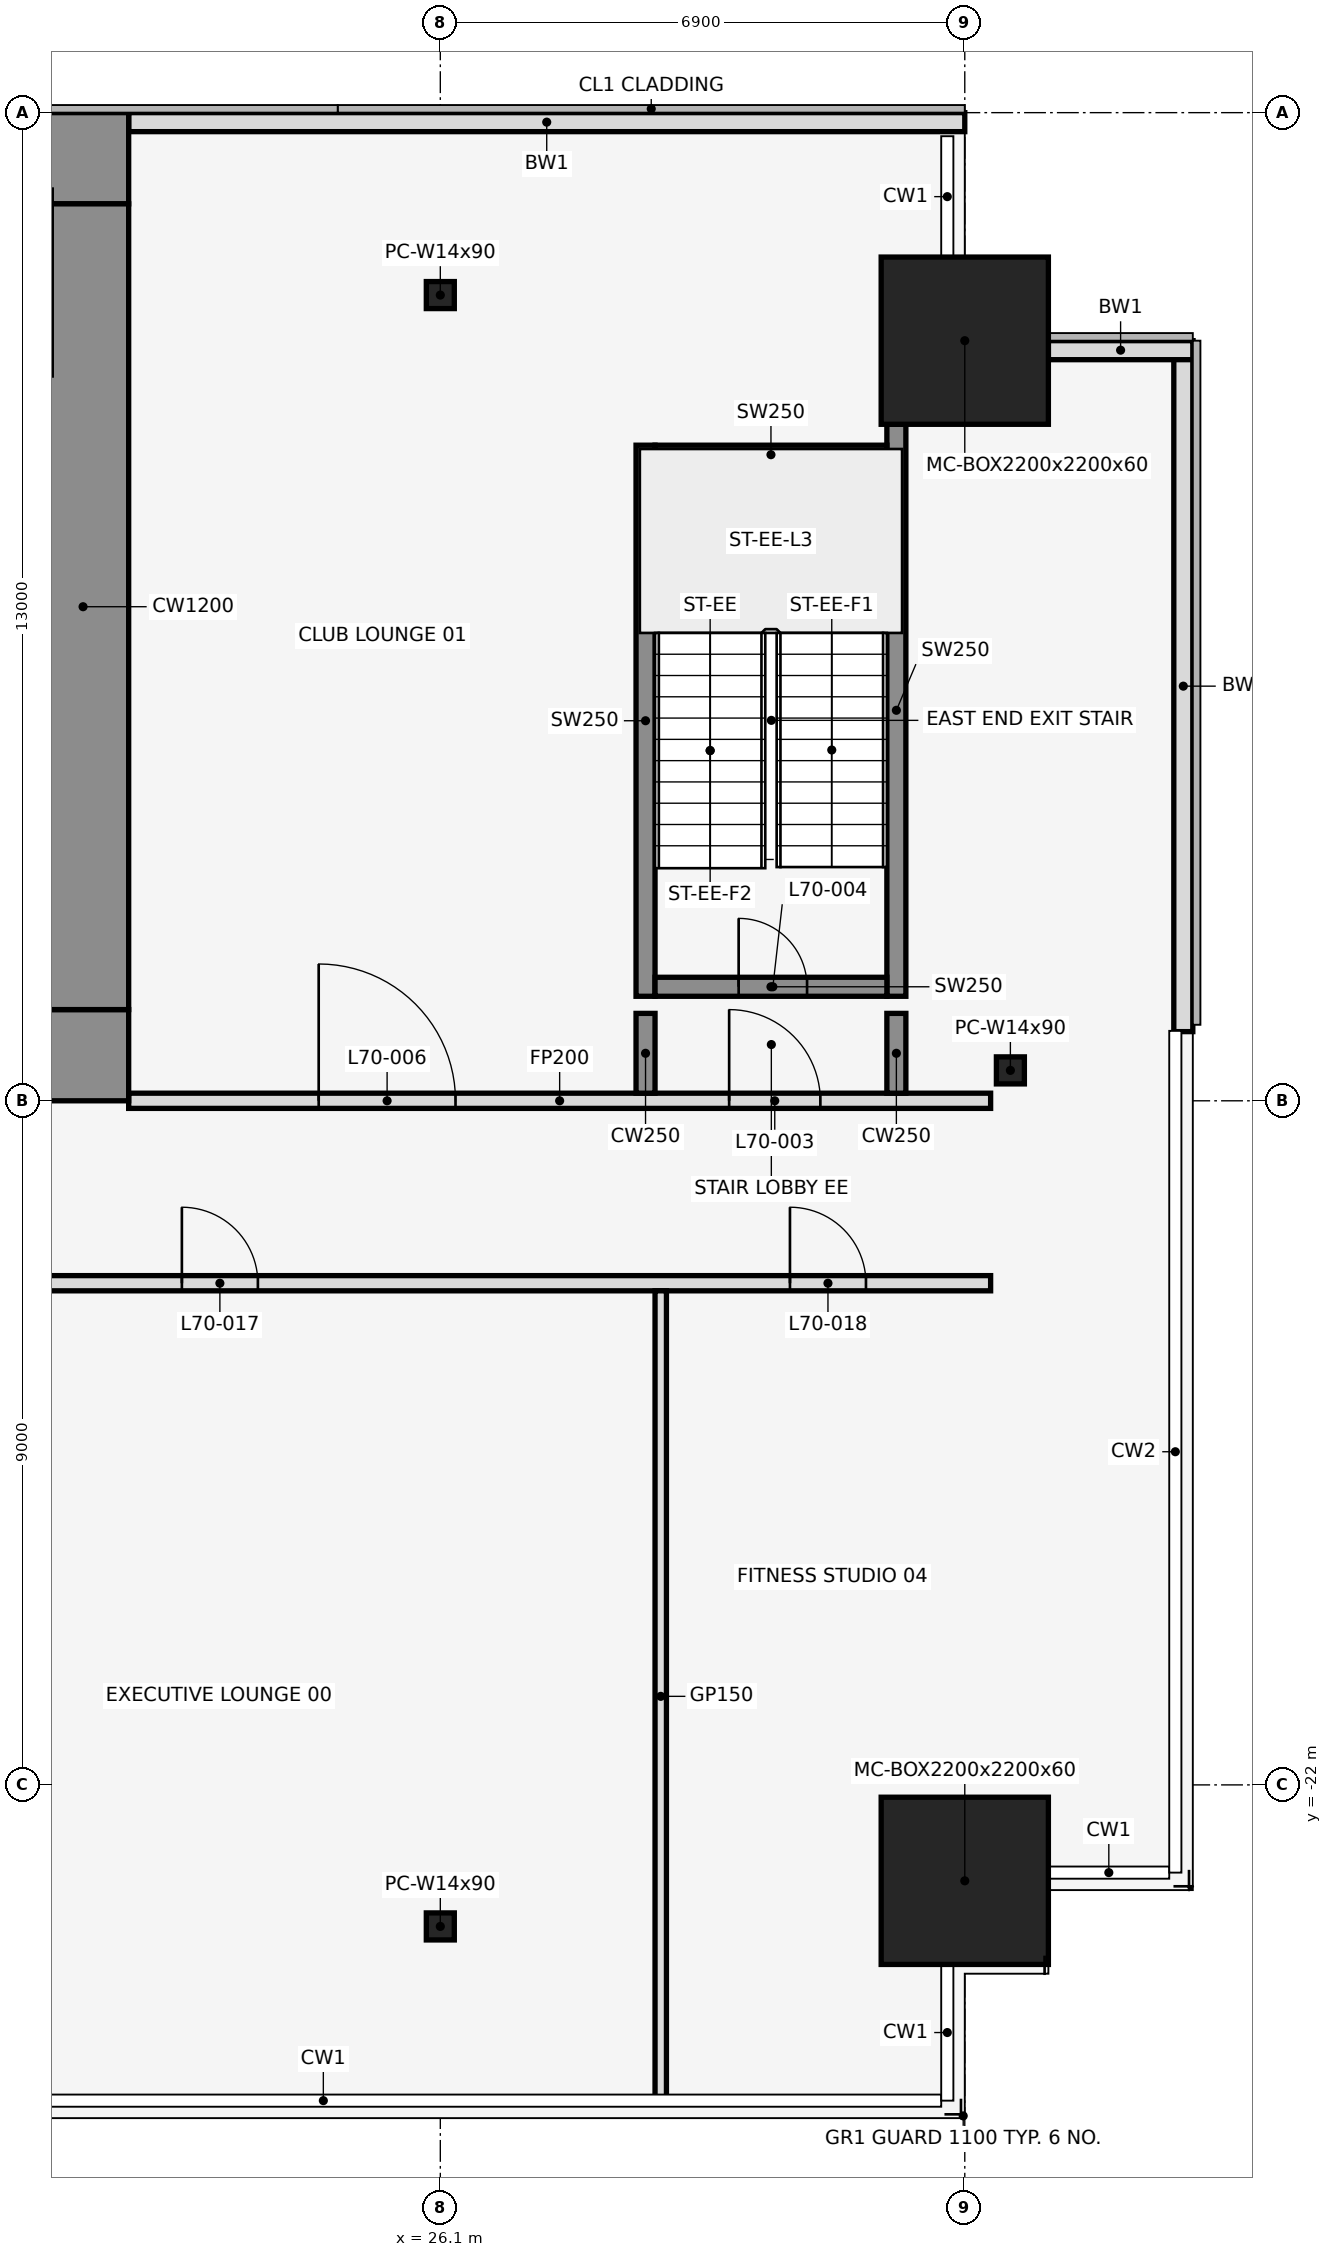
"""IFC4 building model, lengths in metres.
Left out: names, types, materials, properties, quantities, classifications, styles, units other than length and angle.
Written with IfcOpenShell. Run it as: python <this file> out.ifc"""

import sys

from ifc_helpers import new_model, si_unit, direction, frame, frame_2d, origin, origin_2d, place, context, subcontext, project, spatial, rectangle, hollow_rectangle, i_section, extrude, element, fill, save


model = new_model("IFC4")
c1 = context("Model", 3, precision=1e-05, world=origin(), true_north=direction((0.0, 1.0)))
c2 = subcontext(c1, "Body", "Model", "MODEL_VIEW")
j1 = project(units=[si_unit("LENGTHUNIT", "METRE"), si_unit("PLANEANGLEUNIT", "RADIAN")], contexts=[c1])
p1 = place(None, origin())
s1 = spatial("IfcSite", under=j1, at=p1, CompositionType="ELEMENT")
p2 = place(p1, origin())
s2 = spatial("IfcBuilding", under=s1, at=p2, CompositionType="ELEMENT")
p3 = place(p2, frame((0.0, 0.0, 311.0)))
s3 = spatial("IfcBuildingStorey", under=s2, at=p3, CompositionType="ELEMENT", Elevation=311.0)
for number, where, z_axis, x_axis in (
    (1, (26.1, -23.862, 0.0), (0.0, 0.0, 1.0), (1.0, 0.0, 0.0)),
    (2, (26.1, -2.4, 0.0), (0.0, 0.0, 1.0), (1.0, 0.0, 0.0)),
):
    element("IfcColumn", number, at=place(p3, frame(where, z_axis=z_axis, x_axis=x_axis)), inside=s3, PredefinedType="COLUMN", context=c2, shape_type="SweptSolid", body=[
        extrude(i_section(OverallWidth=0.368, OverallDepth=0.356, WebThickness=0.011, FlangeThickness=0.018, at=origin_2d()), origin(), (0.0, 0.0, 1.0), 4.5),
    ])
for number, where, z_axis, x_axis in (
    (3, (33.0, -23.262, 0.0), (0.0, 0.0, 1.0), (1.0, 0.0, 0.0)),
    (4, (33.0, -3.0, 0.0), (0.0, 0.0, 1.0), (1.0, 0.0, 0.0)),
):
    element("IfcColumn", number, at=place(p3, frame(where, z_axis=z_axis, x_axis=x_axis)), inside=s3, PredefinedType="COLUMN", context=c2, shape_type="SweptSolid", body=[
        extrude(hollow_rectangle(XDim=2.2, YDim=2.2, WallThickness=0.06, at=origin_2d()), origin(), (0.0, 0.0, 1.0), 4.5),
    ])
p4 = place(p3, frame((33.6, -12.6, 0.0), z_axis=(0.0, 0.0, 1.0), x_axis=(1.0, 0.0, 0.0)))
e5 = element("IfcColumn", 5, at=p4, inside=s3, PredefinedType="COLUMN", context=c2, shape_type="SweptSolid", body=[
    extrude(i_section(OverallWidth=0.368, OverallDepth=0.356, WebThickness=0.011, FlangeThickness=0.018, at=origin_2d()), origin(), (0.0, 0.0, 1.0), 4.5),
])
p5 = place(p3, frame((33.0, -0.125, 0.0), z_axis=(0.0, 0.0, 1.0), x_axis=(-1.0, 0.0, 0.0)))
e6 = element("IfcWall", 6, at=p5, inside=s3, PredefinedType="STANDARD", context=c2, shape_type="SweptSolid", body=[
    extrude(rectangle(XDim=11.0, YDim=0.25, at=frame_2d((5.5, 0.0))), origin(), (0.0, 0.0, 1.0), 4.35),
])
p6 = place(p3, frame((35.875, -12.09, 0.0), z_axis=(0.0, 0.0, 1.0), x_axis=(0.0, 1.0, 0.0)))
e7 = element("IfcWall", 7, at=p6, inside=s3, PredefinedType="STANDARD", context=c2, shape_type="SweptSolid", body=[
    extrude(rectangle(XDim=9.09, YDim=0.25, at=frame_2d((4.545, 0.0))), origin(), (0.0, 0.0, 1.0), 4.35),
])
p7 = place(p3, frame((36.0, -3.125, 0.0), z_axis=(0.0, 0.0, 1.0), x_axis=(-1.0, 0.0, 0.0)))
e8 = element("IfcWall", 8, at=p7, inside=s3, PredefinedType="STANDARD", context=c2, shape_type="SweptSolid", body=[
    extrude(rectangle(XDim=1.9, YDim=0.25, at=frame_2d((0.95, 0.0))), origin(), (0.0, 0.0, 1.0), 4.35),
])
p8 = place(p3, frame((28.8, -11.625, 0.0), z_axis=(0.0, 0.0, 1.0), x_axis=(0.0, 1.0, 0.0)))
e9 = element("IfcWall", 9, at=p8, inside=s3, PredefinedType="SHEAR", context=c2, shape_type="SweptSolid", body=[
    extrude(rectangle(XDim=7.25, YDim=0.25, at=frame_2d((3.625, 0.0))), origin(), (0.0, 0.0, 1.0), 4.5),
])
p9 = place(p3, frame((32.1, -11.625, 0.0), z_axis=(0.0, 0.0, 1.0), x_axis=(0.0, 1.0, 0.0)))
e10 = element("IfcWall", 10, at=p9, inside=s3, PredefinedType="SHEAR", context=c2, shape_type="SweptSolid", body=[
    extrude(rectangle(XDim=7.525, YDim=0.25, at=frame_2d((3.762, 0.0))), origin(), (0.0, 0.0, 1.0), 4.5),
])
p10 = place(p3, frame((28.925, -11.5, 0.0), z_axis=(0.0, 0.0, 1.0), x_axis=(1.0, 0.0, 0.0)))
e11 = element("IfcWall", 11, at=p10, inside=s3, PredefinedType="SHEAR", context=c2, shape_type="SweptSolid", body=[
    extrude(rectangle(XDim=3.05, YDim=0.25, at=frame_2d((1.525, 0.0))), origin(), (0.0, 0.0, 1.0), 4.5),
])
p11 = place(p10, frame((1.1, 0.0, 0.0)))
e12 = element("IfcOpeningElement", 12, at=p11, cuts=e11, PredefinedType="OPENING", context=c2, shape_type="SweptSolid", body=[
    extrude(rectangle(XDim=0.9, YDim=2.1, at=frame_2d((0.45, 1.05))), frame((0.0, 0.137, 0.0), z_axis=(0.0, -1.0, 0.0), x_axis=(1.0, 0.0, 0.0)), (0.0, 0.0, 1.0), 0.274),
])
p12 = place(p3, frame((28.925, -4.5, 0.0), z_axis=(0.0, 0.0, 1.0), x_axis=(1.0, 0.0, 0.0)))
e13 = element("IfcWall", 13, at=p12, inside=s3, PredefinedType="SHEAR", context=c2, shape_type="SweptSolid", body=[
    extrude(rectangle(XDim=3.05, YDim=0.25, at=frame_2d((1.525, 0.0))), origin(), (0.0, 0.0, 1.0), 4.5),
])
p13 = place(p3, frame((1.4, -15.4, 0.0), z_axis=(0.0, 0.0, 1.0), x_axis=(1.0, 0.0, 0.0)))
e14 = element("IfcWall", 14, at=p13, inside=s3, PredefinedType="PARTITIONING", context=c2, shape_type="SweptSolid", body=[
    extrude(rectangle(XDim=31.94, YDim=0.2, at=frame_2d((15.97, 0.0))), origin(), (0.0, 0.0, 1.0), 3.418),
])
p14 = place(p13, frame((1.7, 0.0, 0.0)))
e15 = element("IfcOpeningElement", 15, at=p14, cuts=e14, PredefinedType="OPENING", context=c2, shape_type="SweptSolid", body=[
    extrude(rectangle(XDim=1.0, YDim=2.1, at=frame_2d((0.5, 1.05))), frame((0.0, 0.112, 0.0), z_axis=(0.0, -1.0, 0.0), x_axis=(1.0, 0.0, 0.0)), (0.0, 0.0, 1.0), 0.224),
])
p15 = place(p13, frame((9.7, 0.0, 0.0)))
e16 = element("IfcOpeningElement", 16, at=p15, cuts=e14, PredefinedType="OPENING", context=c2, shape_type="SweptSolid", body=[
    extrude(rectangle(XDim=1.0, YDim=2.1, at=frame_2d((0.5, 1.05))), frame((0.0, 0.112, 0.0), z_axis=(0.0, -1.0, 0.0), x_axis=(1.0, 0.0, 0.0)), (0.0, 0.0, 1.0), 0.224),
])
p16 = place(p13, frame((21.3, 0.0, 0.0)))
e17 = element("IfcOpeningElement", 17, at=p16, cuts=e14, PredefinedType="OPENING", context=c2, shape_type="SweptSolid", body=[
    extrude(rectangle(XDim=1.0, YDim=2.1, at=frame_2d((0.5, 1.05))), frame((0.0, 0.112, 0.0), z_axis=(0.0, -1.0, 0.0), x_axis=(1.0, 0.0, 0.0)), (0.0, 0.0, 1.0), 0.224),
])
p17 = place(p13, frame((29.3, 0.0, 0.0)))
e18 = element("IfcOpeningElement", 18, at=p17, cuts=e14, PredefinedType="OPENING", context=c2, shape_type="SweptSolid", body=[
    extrude(rectangle(XDim=1.0, YDim=2.1, at=frame_2d((0.5, 1.05))), frame((0.0, 0.112, 0.0), z_axis=(0.0, -1.0, 0.0), x_axis=(1.0, 0.0, 0.0)), (0.0, 0.0, 1.0), 0.224),
])
p18 = place(p3, frame((22.0, -13.0, 0.0), z_axis=(0.0, 0.0, 1.0), x_axis=(1.0, 0.0, 0.0)))
e19 = element("IfcWall", 19, at=p18, inside=s3, PredefinedType="PARTITIONING", context=c2, shape_type="SweptSolid", body=[
    extrude(rectangle(XDim=11.34, YDim=0.2, at=frame_2d((5.67, 0.0))), origin(), (0.0, 0.0, 1.0), 3.418),
])
p19 = place(p18, frame((7.9, 0.0, 0.0)))
e20 = element("IfcOpeningElement", 20, at=p19, cuts=e19, PredefinedType="OPENING", context=c2, shape_type="SweptSolid", body=[
    extrude(rectangle(XDim=1.2, YDim=2.1, at=frame_2d((0.6, 1.05))), frame((0.0, 0.112, 0.0), z_axis=(0.0, -1.0, 0.0), x_axis=(1.0, 0.0, 0.0)), (0.0, 0.0, 1.0), 0.224),
])
p20 = place(p18, frame((2.5, 0.0, 0.0)))
e21 = element("IfcOpeningElement", 21, at=p20, cuts=e19, PredefinedType="OPENING", context=c2, shape_type="SweptSolid", body=[
    extrude(rectangle(XDim=1.8, YDim=2.1, at=frame_2d((0.9, 1.05))), frame((0.0, 0.112, 0.0), z_axis=(0.0, -1.0, 0.0), x_axis=(1.0, 0.0, 0.0)), (0.0, 0.0, 1.0), 0.224),
])
p21 = place(p3, frame((28.8, -12.9, 0.0), z_axis=(0.0, 0.0, 1.0), x_axis=(0.0, 1.0, 0.0)))
e22 = element("IfcWall", 22, at=p21, inside=s3, PredefinedType="SHEAR", context=c2, shape_type="SweptSolid", body=[
    extrude(rectangle(XDim=1.05, YDim=0.25, at=frame_2d((0.525, 0.0))), origin(), (0.0, 0.0, 1.0), 4.5),
])
p22 = place(p3, frame((29.0, -26.17, 0.0), z_axis=(0.0, 0.0, 1.0), x_axis=(0.0, 1.0, 0.0)))
e23 = element("IfcWall", 23, at=p22, inside=s3, PredefinedType="PARTITIONING", context=c2, shape_type="SweptSolid", body=[
    extrude(rectangle(XDim=10.67, YDim=0.15, at=frame_2d((5.335, 0.0))), origin(), (0.0, 0.0, 1.0), 3.418),
])
p23 = place(p3, frame((32.1, -12.9, 0.0), z_axis=(0.0, 0.0, 1.0), x_axis=(0.0, 1.0, 0.0)))
e24 = element("IfcWall", 24, at=p23, inside=s3, PredefinedType="SHEAR", context=c2, shape_type="SweptSolid", body=[
    extrude(rectangle(XDim=1.05, YDim=0.25, at=frame_2d((0.525, 0.0))), origin(), (0.0, 0.0, 1.0), 4.5),
])
p24 = place(p3, frame((-22.0, -0.6, 0.0), z_axis=(0.0, 0.0, 1.0), x_axis=(1.0, 0.0, 0.0)))
e25 = element("IfcWall", 25, at=p24, inside=s3, PredefinedType="SHEAR", context=c2, shape_type="SweptSolid", body=[
    extrude(rectangle(XDim=44.0, YDim=1.2, at=frame_2d((22.0, 0.0))), origin(), (0.0, 0.0, 1.0), 4.5),
])
p25 = place(p24, frame((18.55, 0.0, 0.0)))
e26 = element("IfcOpeningElement", 26, at=p25, cuts=e25, PredefinedType="OPENING", context=c2, shape_type="SweptSolid", body=[
    extrude(rectangle(XDim=0.9, YDim=2.1, at=frame_2d((0.45, 1.05))), frame((0.0, 0.612, 0.0), z_axis=(0.0, -1.0, 0.0), x_axis=(1.0, 0.0, 0.0)), (0.0, 0.0, 1.0), 1.224),
])
p26 = place(p24, frame((24.55, 0.0, 0.0)))
e27 = element("IfcOpeningElement", 27, at=p26, cuts=e25, PredefinedType="OPENING", context=c2, shape_type="SweptSolid", body=[
    extrude(rectangle(XDim=0.9, YDim=2.1, at=frame_2d((0.45, 1.05))), frame((0.0, 0.612, 0.0), z_axis=(0.0, -1.0, 0.0), x_axis=(1.0, 0.0, 0.0)), (0.0, 0.0, 1.0), 1.224),
])
p27 = place(p3, frame((-22.0, -12.4, 0.0), z_axis=(0.0, 0.0, 1.0), x_axis=(1.0, 0.0, 0.0)))
e28 = element("IfcWall", 28, at=p27, inside=s3, PredefinedType="SHEAR", context=c2, shape_type="SweptSolid", body=[
    extrude(rectangle(XDim=44.0, YDim=1.2, at=frame_2d((22.0, 0.0))), origin(), (0.0, 0.0, 1.0), 4.5),
])
p28 = place(p27, frame((2.2, 0.0, 0.0)))
e29 = element("IfcOpeningElement", 29, at=p28, cuts=e28, PredefinedType="OPENING", context=c2, shape_type="SweptSolid", body=[
    extrude(rectangle(XDim=1.2, YDim=2.1, at=frame_2d((0.6, 1.05))), frame((0.0, 0.612, 0.0), z_axis=(0.0, -1.0, 0.0), x_axis=(1.0, 0.0, 0.0)), (0.0, 0.0, 1.0), 1.224),
])
p29 = place(p27, frame((21.4, 0.0, 0.0)))
e30 = element("IfcOpeningElement", 30, at=p29, cuts=e28, PredefinedType="OPENING", context=c2, shape_type="SweptSolid", body=[
    extrude(rectangle(XDim=1.2, YDim=2.1, at=frame_2d((0.6, 1.05))), frame((0.0, 0.612, 0.0), z_axis=(0.0, -1.0, 0.0), x_axis=(1.0, 0.0, 0.0)), (0.0, 0.0, 1.0), 1.224),
])
p30 = place(p27, frame((40.6, 0.0, 0.0)))
e31 = element("IfcOpeningElement", 31, at=p30, cuts=e28, PredefinedType="OPENING", context=c2, shape_type="SweptSolid", body=[
    extrude(rectangle(XDim=1.2, YDim=2.1, at=frame_2d((0.6, 1.05))), frame((0.0, 0.612, 0.0), z_axis=(0.0, -1.0, 0.0), x_axis=(1.0, 0.0, 0.0)), (0.0, 0.0, 1.0), 1.224),
])
p31 = place(p27, frame((16.0, 0.0, 0.0)))
e32 = element("IfcOpeningElement", 32, at=p31, cuts=e28, PredefinedType="OPENING", context=c2, shape_type="SweptSolid", body=[
    extrude(rectangle(XDim=1.8, YDim=2.1, at=frame_2d((0.9, 1.05))), frame((0.0, 0.612, 0.0), z_axis=(0.0, -1.0, 0.0), x_axis=(1.0, 0.0, 0.0)), (0.0, 0.0, 1.0), 1.224),
])
p32 = place(p27, frame((6.3, 0.0, 0.0)))
e33 = element("IfcOpeningElement", 33, at=p32, cuts=e28, PredefinedType="OPENING", context=c2, shape_type="SweptSolid", body=[
    extrude(rectangle(XDim=1.2, YDim=2.1, at=frame_2d((0.6, 1.05))), frame((0.0, 0.612, 0.0), z_axis=(0.0, -1.0, 0.0), x_axis=(1.0, 0.0, 0.0)), (0.0, 0.0, 1.0), 1.224),
])
p33 = place(p27, frame((26.2, 0.0, 0.0)))
e34 = element("IfcOpeningElement", 34, at=p33, cuts=e28, PredefinedType="OPENING", context=c2, shape_type="SweptSolid", body=[
    extrude(rectangle(XDim=1.8, YDim=2.1, at=frame_2d((0.9, 1.05))), frame((0.0, 0.612, 0.0), z_axis=(0.0, -1.0, 0.0), x_axis=(1.0, 0.0, 0.0)), (0.0, 0.0, 1.0), 1.224),
])
p34 = place(p27, frame((36.5, 0.0, 0.0)))
e35 = element("IfcOpeningElement", 35, at=p34, cuts=e28, PredefinedType="OPENING", context=c2, shape_type="SweptSolid", body=[
    extrude(rectangle(XDim=1.2, YDim=2.1, at=frame_2d((0.6, 1.05))), frame((0.0, 0.612, 0.0), z_axis=(0.0, -1.0, 0.0), x_axis=(1.0, 0.0, 0.0)), (0.0, 0.0, 1.0), 1.224),
])
p35 = place(p3, frame((21.4, -11.8, 0.0), z_axis=(0.0, 0.0, 1.0), x_axis=(0.0, 1.0, 0.0)))
e36 = element("IfcWall", 36, at=p35, inside=s3, PredefinedType="SHEAR", context=c2, shape_type="SweptSolid", body=[
    extrude(rectangle(XDim=10.6, YDim=1.2, at=frame_2d((5.3, 0.0))), origin(), (0.0, 0.0, 1.0), 4.5),
])
p36 = place(p19, origin())
e37 = element("IfcDoor", 37, at=p36, inside=s3, OperationType="SINGLE_SWING_RIGHT", PredefinedType="DOOR", context=c2, shape_type="SweptSolid", body=[
    extrude(rectangle(XDim=1.2, YDim=2.1, at=frame_2d((0.6, 1.05))), frame((0.0, 0.025, 0.0), z_axis=(0.0, -1.0, 0.0), x_axis=(1.0, 0.0, 0.0)), (0.0, 0.0, 1.0), 0.05),
])
fill(e20, e37)
p37 = place(p11, origin())
e38 = element("IfcDoor", 38, at=p37, inside=s3, OperationType="SINGLE_SWING_LEFT", PredefinedType="DOOR", context=c2, shape_type="SweptSolid", body=[
    extrude(rectangle(XDim=0.9, YDim=2.1, at=frame_2d((0.45, 1.05))), frame((0.0, 0.025, 0.0), z_axis=(0.0, -1.0, 0.0), x_axis=(1.0, 0.0, 0.0)), (0.0, 0.0, 1.0), 0.05),
])
fill(e12, e38)
p38 = place(p20, origin())
e39 = element("IfcDoor", 39, at=p38, inside=s3, OperationType="SINGLE_SWING_LEFT", PredefinedType="DOOR", context=c2, shape_type="SweptSolid", body=[
    extrude(rectangle(XDim=1.8, YDim=2.1, at=frame_2d((0.9, 1.05))), frame((0.0, 0.025, 0.0), z_axis=(0.0, -1.0, 0.0), x_axis=(1.0, 0.0, 0.0)), (0.0, 0.0, 1.0), 0.05),
])
fill(e21, e39)
p39 = place(p16, frame((1.0, 0.0, 0.0), z_axis=(0.0, 0.0, 1.0), x_axis=(-1.0, 0.0, 0.0)))
e40 = element("IfcDoor", 40, at=p39, inside=s3, OperationType="SINGLE_SWING_RIGHT", PredefinedType="DOOR", context=c2, shape_type="SweptSolid", body=[
    extrude(rectangle(XDim=1.0, YDim=2.1, at=frame_2d((0.5, 1.05))), frame((0.0, 0.025, 0.0), z_axis=(0.0, -1.0, 0.0), x_axis=(1.0, 0.0, 0.0)), (0.0, 0.0, 1.0), 0.05),
])
fill(e17, e40)
p40 = place(p17, frame((1.0, 0.0, 0.0), z_axis=(0.0, 0.0, 1.0), x_axis=(-1.0, 0.0, 0.0)))
e41 = element("IfcDoor", 41, at=p40, inside=s3, OperationType="SINGLE_SWING_RIGHT", PredefinedType="DOOR", context=c2, shape_type="SweptSolid", body=[
    extrude(rectangle(XDim=1.0, YDim=2.1, at=frame_2d((0.5, 1.05))), frame((0.0, 0.025, 0.0), z_axis=(0.0, -1.0, 0.0), x_axis=(1.0, 0.0, 0.0)), (0.0, 0.0, 1.0), 0.05),
])
fill(e18, e41)
save(model, sys.argv[1])
